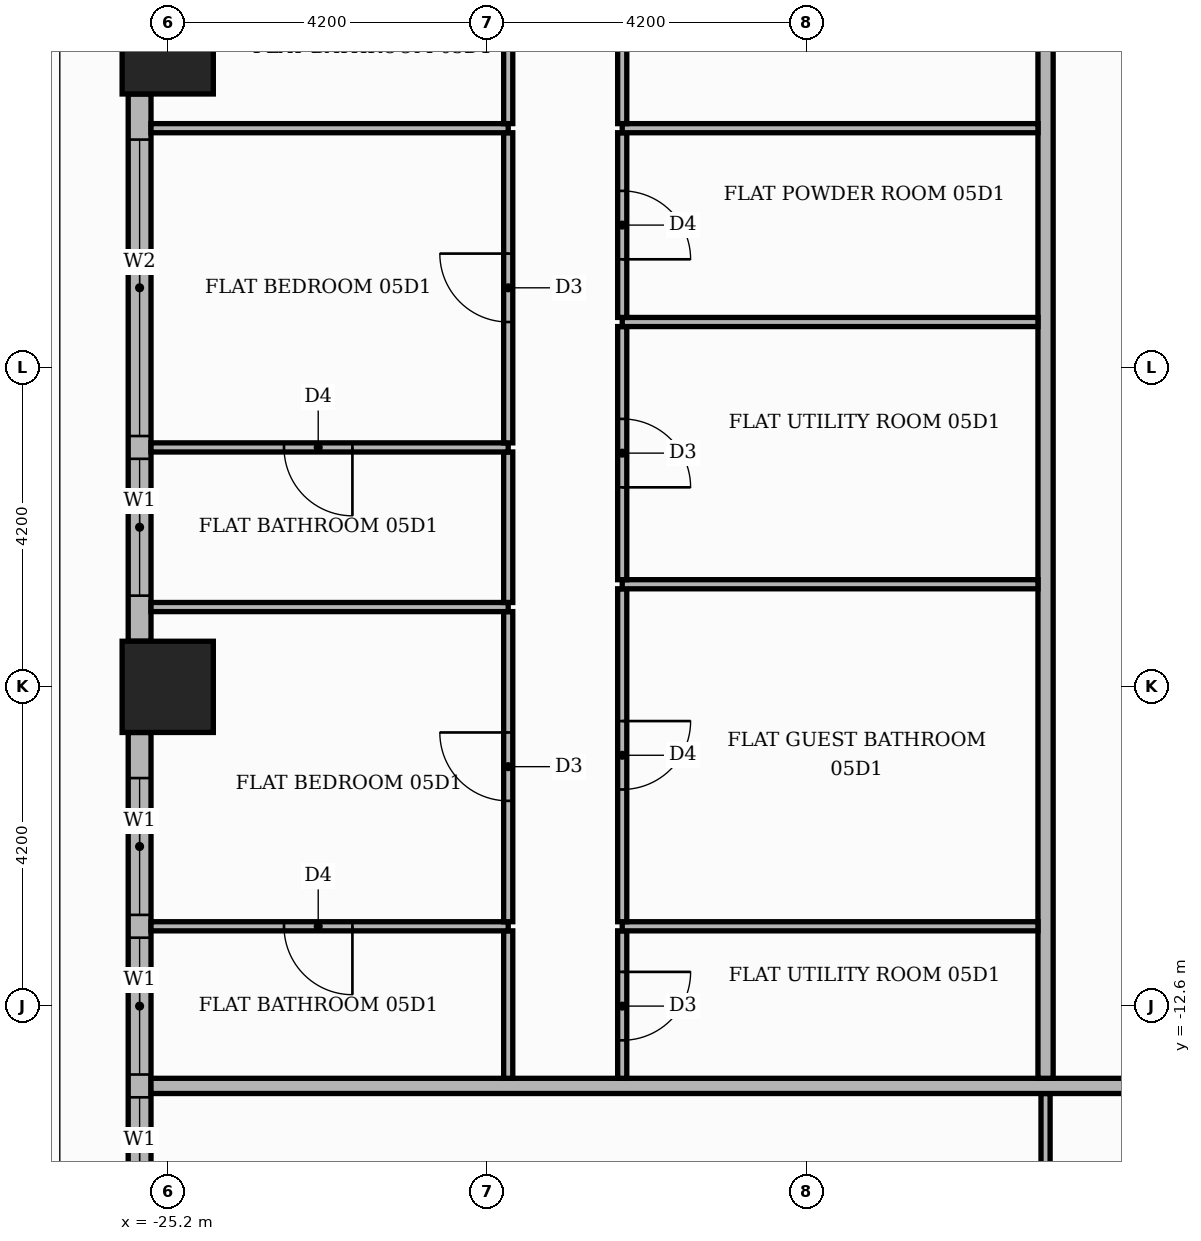
"""IFC4 building model, lengths in metres.
Left out: names, types, materials, properties, quantities, classifications, styles, units other than length and angle.
Written with IfcOpenShell. Run it as: python <this file> out.ifc"""

import sys

from ifc_helpers import new_model, si_unit, direction, frame, frame_2d, origin, origin_2d, place, context, subcontext, project, spatial, rectangle, extrude, element, fill, save


model = new_model("IFC4")
c1 = context("Model", 3, precision=1e-05, world=origin(), true_north=direction((0.0, 1.0)))
c2 = subcontext(c1, "Body", "Model", "MODEL_VIEW")
j1 = project(units=[si_unit("LENGTHUNIT", "METRE"), si_unit("PLANEANGLEUNIT", "RADIAN")], contexts=[c1])
p1 = place(None, origin())
s1 = spatial("IfcSite", under=j1, at=p1, CompositionType="ELEMENT")
p2 = place(p1, origin())
s2 = spatial("IfcBuilding", under=s1, at=p2, CompositionType="ELEMENT")
p3 = place(p2, frame((0.0, 0.0, 27.0)))
s3 = spatial("IfcBuildingStorey", under=s2, at=p3, CompositionType="ELEMENT", Elevation=27.0)
for number, where, z_axis, x_axis in (
    (1, (-25.2, 0.0, 0.0), (0.0, 0.0, 1.0), (1.0, 0.0, 0.0)),
    (2, (-25.2, -8.4, 0.0), (0.0, 0.0, 1.0), (1.0, 0.0, 0.0)),
):
    element("IfcColumn", number, at=place(p3, frame(where, z_axis=z_axis, x_axis=x_axis)), inside=s3, PredefinedType="COLUMN", context=c2, shape_type="SweptSolid", body=[
        extrude(rectangle(XDim=1.2, YDim=1.2, at=origin_2d()), origin(), (0.0, 0.0, 1.0), 3.9),
    ])
p4 = place(p3, frame((-25.57, -0.6, 0.0), z_axis=(0.0, 0.0, 1.0), x_axis=(0.0, -1.0, 0.0)))
e3 = element("IfcWall", 3, at=p4, inside=s3, PredefinedType="STANDARD", context=c2, shape_type="SweptSolid", body=[
    extrude(rectangle(XDim=7.2, YDim=0.3, at=frame_2d((3.6, 0.0))), origin(), (0.0, 0.0, 1.0), 3.48),
])
p5 = place(p4, frame((0.6, 0.0, 0.9)))
e4 = element("IfcOpeningElement", 4, at=p5, cuts=e3, PredefinedType="OPENING", context=c2, shape_type="SweptSolid", body=[
    extrude(rectangle(XDim=3.9, YDim=2.1, at=frame_2d((1.95, 1.05))), frame((0.0, 0.16, 0.0), z_axis=(0.0, -1.0, 0.0), x_axis=(1.0, 0.0, 0.0)), (0.0, 0.0, 1.0), 0.32),
])
p6 = place(p4, frame((4.8, 0.0, 0.9)))
e5 = element("IfcOpeningElement", 5, at=p6, cuts=e3, PredefinedType="OPENING", context=c2, shape_type="SweptSolid", body=[
    extrude(rectangle(XDim=1.8, YDim=2.1, at=frame_2d((0.9, 1.05))), frame((0.0, 0.16, 0.0), z_axis=(0.0, -1.0, 0.0), x_axis=(1.0, 0.0, 0.0)), (0.0, 0.0, 1.0), 0.32),
])
p7 = place(p3, frame((-25.57, -9.0, 0.0), z_axis=(0.0, 0.0, 1.0), x_axis=(0.0, -1.0, 0.0)))
e6 = element("IfcWall", 6, at=p7, inside=s3, PredefinedType="STANDARD", context=c2, shape_type="SweptSolid", body=[
    extrude(rectangle(XDim=7.2, YDim=0.3, at=frame_2d((3.6, 0.0))), origin(), (0.0, 0.0, 1.0), 3.48),
])
p8 = place(p7, frame((0.6, 0.0, 0.9)))
e7 = element("IfcOpeningElement", 7, at=p8, cuts=e6, PredefinedType="OPENING", context=c2, shape_type="SweptSolid", body=[
    extrude(rectangle(XDim=1.8, YDim=2.1, at=frame_2d((0.9, 1.05))), frame((0.0, 0.16, 0.0), z_axis=(0.0, -1.0, 0.0), x_axis=(1.0, 0.0, 0.0)), (0.0, 0.0, 1.0), 0.32),
])
p9 = place(p7, frame((2.7, 0.0, 0.9)))
e8 = element("IfcOpeningElement", 8, at=p9, cuts=e6, PredefinedType="OPENING", context=c2, shape_type="SweptSolid", body=[
    extrude(rectangle(XDim=1.8, YDim=2.1, at=frame_2d((0.9, 1.05))), frame((0.0, 0.16, 0.0), z_axis=(0.0, -1.0, 0.0), x_axis=(1.0, 0.0, 0.0)), (0.0, 0.0, 1.0), 0.32),
])
p10 = place(p7, frame((4.8, 0.0, 0.9)))
e9 = element("IfcOpeningElement", 9, at=p10, cuts=e6, PredefinedType="OPENING", context=c2, shape_type="SweptSolid", body=[
    extrude(rectangle(XDim=1.8, YDim=2.1, at=frame_2d((0.9, 1.05))), frame((0.0, 0.16, 0.0), z_axis=(0.0, -1.0, 0.0), x_axis=(1.0, 0.0, 0.0)), (0.0, 0.0, 1.0), 0.32),
])
p11 = place(p3, frame((-13.65, -20.06, 0.0), z_axis=(0.0, 0.0, 1.0), x_axis=(0.0, 1.0, 0.0)))
e10 = element("IfcWall", 10, at=p11, inside=s3, PredefinedType="PARTITIONING", context=c2, shape_type="SweptSolid", body=[
    extrude(rectangle(XDim=6.31, YDim=0.12, at=frame_2d((3.155, 0.0))), origin(), (0.0, 0.0, 1.0), 3.48),
])
p12 = place(p11, frame((2.675, 0.0, 0.0)))
e11 = element("IfcOpeningElement", 11, at=p12, cuts=e10, PredefinedType="OPENING", context=c2, shape_type="SweptSolid", body=[
    extrude(rectangle(XDim=1.0, YDim=2.1, at=frame_2d((0.5, 1.05))), frame((0.0, 0.07, 0.0), z_axis=(0.0, -1.0, 0.0), x_axis=(1.0, 0.0, 0.0)), (0.0, 0.0, 1.0), 0.14),
])
p13 = place(p3, frame((-25.42, -13.65, 0.0), z_axis=(0.0, 0.0, 1.0), x_axis=(1.0, 0.0, 0.0)))
e12 = element("IfcWall", 12, at=p13, inside=s3, PredefinedType="PARTITIONING", context=c2, shape_type="SweptSolid", body=[
    extrude(rectangle(XDim=39.07, YDim=0.2, at=frame_2d((19.535, 0.0))), origin(), (0.0, 0.0, 1.0), 3.48),
])
p14 = place(p13, frame((14.37, 0.0, 0.0)))
e13 = element("IfcOpeningElement", 13, at=p14, cuts=e12, PredefinedType="OPENING", context=c2, shape_type="SweptSolid", body=[
    extrude(rectangle(XDim=1.1, YDim=2.4, at=frame_2d((0.55, 1.2))), frame((0.0, 0.11, 0.0), z_axis=(0.0, -1.0, 0.0), x_axis=(1.0, 0.0, 0.0)), (0.0, 0.0, 1.0), 0.22),
])
p15 = place(p3, frame((-20.72, -13.55, 0.0), z_axis=(0.0, 0.0, 1.0), x_axis=(0.0, 1.0, 0.0)))
e14 = element("IfcWall", 14, at=p15, inside=s3, PredefinedType="PARTITIONING", context=c2, shape_type="SweptSolid", body=[
    extrude(rectangle(XDim=1.94, YDim=0.12, at=frame_2d((0.97, 0.0))), origin(), (0.0, 0.0, 1.0), 3.48),
])
p16 = place(p3, frame((-19.22, -13.55, 0.0), z_axis=(0.0, 0.0, 1.0), x_axis=(0.0, 1.0, 0.0)))
e15 = element("IfcWall", 15, at=p16, inside=s3, PredefinedType="PARTITIONING", context=c2, shape_type="SweptSolid", body=[
    extrude(rectangle(XDim=1.94, YDim=0.12, at=frame_2d((0.97, 0.0))), origin(), (0.0, 0.0, 1.0), 3.48),
])
p17 = place(p16, frame((0.5, 0.0, 0.0)))
e16 = element("IfcOpeningElement", 16, at=p17, cuts=e15, PredefinedType="OPENING", context=c2, shape_type="SweptSolid", body=[
    extrude(rectangle(XDim=0.9, YDim=2.1, at=frame_2d((0.45, 1.05))), frame((0.0, 0.07, 0.0), z_axis=(0.0, -1.0, 0.0), x_axis=(1.0, 0.0, 0.0)), (0.0, 0.0, 1.0), 0.14),
])
p18 = place(p3, frame((-13.65, -13.55, 0.0), z_axis=(0.0, 0.0, 1.0), x_axis=(0.0, 1.0, 0.0)))
e17 = element("IfcWall", 17, at=p18, inside=s3, PredefinedType="PARTITIONING", context=c2, shape_type="SweptSolid", body=[
    extrude(rectangle(XDim=27.1, YDim=0.2, at=frame_2d((13.55, 0.0))), origin(), (0.0, 0.0, 1.0), 3.48),
])
p19 = place(p18, frame((24.55, 0.0, 0.0)))
e18 = element("IfcOpeningElement", 18, at=p19, cuts=e17, PredefinedType="OPENING", context=c2, shape_type="SweptSolid", body=[
    extrude(rectangle(XDim=1.1, YDim=2.4, at=frame_2d((0.55, 1.2))), frame((0.0, 0.11, 0.0), z_axis=(0.0, -1.0, 0.0), x_axis=(1.0, 0.0, 0.0)), (0.0, 0.0, 1.0), 0.22),
])
p20 = place(p3, frame((-25.42, -11.55, 0.0), z_axis=(0.0, 0.0, 1.0), x_axis=(1.0, 0.0, 0.0)))
e19 = element("IfcWall", 19, at=p20, inside=s3, PredefinedType="PARTITIONING", context=c2, shape_type="SweptSolid", body=[
    extrude(rectangle(XDim=4.7, YDim=0.12, at=frame_2d((2.35, 0.0))), origin(), (0.0, 0.0, 1.0), 3.48),
])
p21 = place(p20, frame((1.75, 0.0, 0.0)))
e20 = element("IfcOpeningElement", 20, at=p21, cuts=e19, PredefinedType="OPENING", context=c2, shape_type="SweptSolid", body=[
    extrude(rectangle(XDim=0.9, YDim=2.1, at=frame_2d((0.45, 1.05))), frame((0.0, 0.07, 0.0), z_axis=(0.0, -1.0, 0.0), x_axis=(1.0, 0.0, 0.0)), (0.0, 0.0, 1.0), 0.14),
])
p22 = place(p3, frame((-19.22, -11.55, 0.0), z_axis=(0.0, 0.0, 1.0), x_axis=(1.0, 0.0, 0.0)))
e21 = element("IfcWall", 21, at=p22, inside=s3, PredefinedType="PARTITIONING", context=c2, shape_type="SweptSolid", body=[
    extrude(rectangle(XDim=5.47, YDim=0.12, at=frame_2d((2.735, 0.0))), origin(), (0.0, 0.0, 1.0), 3.48),
])
p23 = place(p3, frame((-20.72, -11.49, 0.0), z_axis=(0.0, 0.0, 1.0), x_axis=(0.0, 1.0, 0.0)))
e22 = element("IfcWall", 22, at=p23, inside=s3, PredefinedType="PARTITIONING", context=c2, shape_type="SweptSolid", body=[
    extrude(rectangle(XDim=4.08, YDim=0.12, at=frame_2d((2.04, 0.0))), origin(), (0.0, 0.0, 1.0), 3.48),
])
p24 = place(p23, frame((1.59, 0.0, 0.0)))
e23 = element("IfcOpeningElement", 23, at=p24, cuts=e22, PredefinedType="OPENING", context=c2, shape_type="SweptSolid", body=[
    extrude(rectangle(XDim=0.9, YDim=2.1, at=frame_2d((0.45, 1.05))), frame((0.0, 0.07, 0.0), z_axis=(0.0, -1.0, 0.0), x_axis=(1.0, 0.0, 0.0)), (0.0, 0.0, 1.0), 0.14),
])
p25 = place(p3, frame((-19.22, -11.49, 0.0), z_axis=(0.0, 0.0, 1.0), x_axis=(0.0, 1.0, 0.0)))
e24 = element("IfcWall", 24, at=p25, inside=s3, PredefinedType="PARTITIONING", context=c2, shape_type="SweptSolid", body=[
    extrude(rectangle(XDim=4.38, YDim=0.12, at=frame_2d((2.19, 0.0))), origin(), (0.0, 0.0, 1.0), 3.48),
])
p26 = place(p25, frame((1.74, 0.0, 0.0)))
e25 = element("IfcOpeningElement", 25, at=p26, cuts=e24, PredefinedType="OPENING", context=c2, shape_type="SweptSolid", body=[
    extrude(rectangle(XDim=0.9, YDim=2.1, at=frame_2d((0.45, 1.05))), frame((0.0, 0.07, 0.0), z_axis=(0.0, -1.0, 0.0), x_axis=(1.0, 0.0, 0.0)), (0.0, 0.0, 1.0), 0.14),
])
p27 = place(p3, frame((-25.42, -7.35, 0.0), z_axis=(0.0, 0.0, 1.0), x_axis=(1.0, 0.0, 0.0)))
e26 = element("IfcWall", 26, at=p27, inside=s3, PredefinedType="PARTITIONING", context=c2, shape_type="SweptSolid", body=[
    extrude(rectangle(XDim=4.7, YDim=0.12, at=frame_2d((2.35, 0.0))), origin(), (0.0, 0.0, 1.0), 3.48),
])
p28 = place(p3, frame((-20.72, -7.29, 0.0), z_axis=(0.0, 0.0, 1.0), x_axis=(0.0, 1.0, 0.0)))
e27 = element("IfcWall", 27, at=p28, inside=s3, PredefinedType="PARTITIONING", context=c2, shape_type="SweptSolid", body=[
    extrude(rectangle(XDim=1.98, YDim=0.12, at=frame_2d((0.99, 0.0))), origin(), (0.0, 0.0, 1.0), 3.48),
])
p29 = place(p3, frame((-19.22, -7.05, 0.0), z_axis=(0.0, 0.0, 1.0), x_axis=(1.0, 0.0, 0.0)))
e28 = element("IfcWall", 28, at=p29, inside=s3, PredefinedType="PARTITIONING", context=c2, shape_type="SweptSolid", body=[
    extrude(rectangle(XDim=5.47, YDim=0.12, at=frame_2d((2.735, 0.0))), origin(), (0.0, 0.0, 1.0), 3.48),
])
p30 = place(p3, frame((-19.22, -6.99, 0.0), z_axis=(0.0, 0.0, 1.0), x_axis=(0.0, 1.0, 0.0)))
e29 = element("IfcWall", 29, at=p30, inside=s3, PredefinedType="PARTITIONING", context=c2, shape_type="SweptSolid", body=[
    extrude(rectangle(XDim=3.33, YDim=0.12, at=frame_2d((1.665, 0.0))), origin(), (0.0, 0.0, 1.0), 3.48),
])
p31 = place(p30, frame((1.215, 0.0, 0.0)))
e30 = element("IfcOpeningElement", 30, at=p31, cuts=e29, PredefinedType="OPENING", context=c2, shape_type="SweptSolid", body=[
    extrude(rectangle(XDim=0.9, YDim=2.1, at=frame_2d((0.45, 1.05))), frame((0.0, 0.07, 0.0), z_axis=(0.0, -1.0, 0.0), x_axis=(1.0, 0.0, 0.0)), (0.0, 0.0, 1.0), 0.14),
])
p32 = place(p3, frame((-25.42, -5.25, 0.0), z_axis=(0.0, 0.0, 1.0), x_axis=(1.0, 0.0, 0.0)))
e31 = element("IfcWall", 31, at=p32, inside=s3, PredefinedType="PARTITIONING", context=c2, shape_type="SweptSolid", body=[
    extrude(rectangle(XDim=4.7, YDim=0.12, at=frame_2d((2.35, 0.0))), origin(), (0.0, 0.0, 1.0), 3.48),
])
p33 = place(p32, frame((1.75, 0.0, 0.0)))
e32 = element("IfcOpeningElement", 32, at=p33, cuts=e31, PredefinedType="OPENING", context=c2, shape_type="SweptSolid", body=[
    extrude(rectangle(XDim=0.9, YDim=2.1, at=frame_2d((0.45, 1.05))), frame((0.0, 0.07, 0.0), z_axis=(0.0, -1.0, 0.0), x_axis=(1.0, 0.0, 0.0)), (0.0, 0.0, 1.0), 0.14),
])
p34 = place(p3, frame((-20.72, -5.19, 0.0), z_axis=(0.0, 0.0, 1.0), x_axis=(0.0, 1.0, 0.0)))
e33 = element("IfcWall", 33, at=p34, inside=s3, PredefinedType="PARTITIONING", context=c2, shape_type="SweptSolid", body=[
    extrude(rectangle(XDim=4.08, YDim=0.12, at=frame_2d((2.04, 0.0))), origin(), (0.0, 0.0, 1.0), 3.48),
])
p35 = place(p34, frame((1.59, 0.0, 0.0)))
e34 = element("IfcOpeningElement", 34, at=p35, cuts=e33, PredefinedType="OPENING", context=c2, shape_type="SweptSolid", body=[
    extrude(rectangle(XDim=0.9, YDim=2.1, at=frame_2d((0.45, 1.05))), frame((0.0, 0.07, 0.0), z_axis=(0.0, -1.0, 0.0), x_axis=(1.0, 0.0, 0.0)), (0.0, 0.0, 1.0), 0.14),
])
p36 = place(p3, frame((-19.22, -3.6, 0.0), z_axis=(0.0, 0.0, 1.0), x_axis=(1.0, 0.0, 0.0)))
e35 = element("IfcWall", 35, at=p36, inside=s3, PredefinedType="PARTITIONING", context=c2, shape_type="SweptSolid", body=[
    extrude(rectangle(XDim=5.47, YDim=0.12, at=frame_2d((2.735, 0.0))), origin(), (0.0, 0.0, 1.0), 3.48),
])
p37 = place(p3, frame((-19.22, -3.54, 0.0), z_axis=(0.0, 0.0, 1.0), x_axis=(0.0, 1.0, 0.0)))
e36 = element("IfcWall", 36, at=p37, inside=s3, PredefinedType="PARTITIONING", context=c2, shape_type="SweptSolid", body=[
    extrude(rectangle(XDim=2.43, YDim=0.12, at=frame_2d((1.215, 0.0))), origin(), (0.0, 0.0, 1.0), 3.48),
])
p38 = place(p37, frame((0.765, 0.0, 0.0)))
e37 = element("IfcOpeningElement", 37, at=p38, cuts=e36, PredefinedType="OPENING", context=c2, shape_type="SweptSolid", body=[
    extrude(rectangle(XDim=0.9, YDim=2.1, at=frame_2d((0.45, 1.05))), frame((0.0, 0.07, 0.0), z_axis=(0.0, -1.0, 0.0), x_axis=(1.0, 0.0, 0.0)), (0.0, 0.0, 1.0), 0.14),
])
p39 = place(p3, frame((-25.42, -1.05, 0.0), z_axis=(0.0, 0.0, 1.0), x_axis=(1.0, 0.0, 0.0)))
e38 = element("IfcWall", 38, at=p39, inside=s3, PredefinedType="PARTITIONING", context=c2, shape_type="SweptSolid", body=[
    extrude(rectangle(XDim=4.7, YDim=0.12, at=frame_2d((2.35, 0.0))), origin(), (0.0, 0.0, 1.0), 3.48),
])
p40 = place(p3, frame((-19.22, -1.05, 0.0), z_axis=(0.0, 0.0, 1.0), x_axis=(1.0, 0.0, 0.0)))
e39 = element("IfcWall", 39, at=p40, inside=s3, PredefinedType="PARTITIONING", context=c2, shape_type="SweptSolid", body=[
    extrude(rectangle(XDim=5.47, YDim=0.12, at=frame_2d((2.735, 0.0))), origin(), (0.0, 0.0, 1.0), 3.48),
])
p41 = place(p3, frame((-20.72, -0.99, 0.0), z_axis=(0.0, 0.0, 1.0), x_axis=(0.0, 1.0, 0.0)))
e40 = element("IfcWall", 40, at=p41, inside=s3, PredefinedType="PARTITIONING", context=c2, shape_type="SweptSolid", body=[
    extrude(rectangle(XDim=1.98, YDim=0.12, at=frame_2d((0.99, 0.0))), origin(), (0.0, 0.0, 1.0), 3.48),
])
p42 = place(p3, frame((-19.22, -0.99, 0.0), z_axis=(0.0, 0.0, 1.0), x_axis=(0.0, 1.0, 0.0)))
e41 = element("IfcWall", 41, at=p42, inside=s3, PredefinedType="PARTITIONING", context=c2, shape_type="SweptSolid", body=[
    extrude(rectangle(XDim=4.08, YDim=0.12, at=frame_2d((2.04, 0.0))), origin(), (0.0, 0.0, 1.0), 3.48),
])
p43 = place(p42, frame((1.59, 0.0, 0.0)))
e42 = element("IfcOpeningElement", 42, at=p43, cuts=e41, PredefinedType="OPENING", context=c2, shape_type="SweptSolid", body=[
    extrude(rectangle(XDim=0.9, YDim=2.1, at=frame_2d((0.45, 1.05))), frame((0.0, 0.07, 0.0), z_axis=(0.0, -1.0, 0.0), x_axis=(1.0, 0.0, 0.0)), (0.0, 0.0, 1.0), 0.14),
])
p44 = place(p5, origin())
e43 = element("IfcWindow", 43, at=p44, inside=s3, PartitioningType="SINGLE_PANEL", PredefinedType="WINDOW", context=c2, shape_type="SweptSolid", body=[
    extrude(rectangle(XDim=3.9, YDim=2.1, at=frame_2d((1.95, 1.05))), frame((0.0, 0.03, 0.0), z_axis=(0.0, -1.0, 0.0), x_axis=(1.0, 0.0, 0.0)), (0.0, 0.0, 1.0), 0.06),
])
fill(e4, e43)
p45 = place(p6, origin())
e44 = element("IfcWindow", 44, at=p45, inside=s3, PartitioningType="SINGLE_PANEL", PredefinedType="WINDOW", context=c2, shape_type="SweptSolid", body=[
    extrude(rectangle(XDim=1.8, YDim=2.1, at=frame_2d((0.9, 1.05))), frame((0.0, 0.03, 0.0), z_axis=(0.0, -1.0, 0.0), x_axis=(1.0, 0.0, 0.0)), (0.0, 0.0, 1.0), 0.06),
])
fill(e5, e44)
p46 = place(p8, origin())
e45 = element("IfcWindow", 45, at=p46, inside=s3, PartitioningType="SINGLE_PANEL", PredefinedType="WINDOW", context=c2, shape_type="SweptSolid", body=[
    extrude(rectangle(XDim=1.8, YDim=2.1, at=frame_2d((0.9, 1.05))), frame((0.0, 0.03, 0.0), z_axis=(0.0, -1.0, 0.0), x_axis=(1.0, 0.0, 0.0)), (0.0, 0.0, 1.0), 0.06),
])
fill(e7, e45)
p47 = place(p9, origin())
e46 = element("IfcWindow", 46, at=p47, inside=s3, PartitioningType="SINGLE_PANEL", PredefinedType="WINDOW", context=c2, shape_type="SweptSolid", body=[
    extrude(rectangle(XDim=1.8, YDim=2.1, at=frame_2d((0.9, 1.05))), frame((0.0, 0.03, 0.0), z_axis=(0.0, -1.0, 0.0), x_axis=(1.0, 0.0, 0.0)), (0.0, 0.0, 1.0), 0.06),
])
fill(e8, e46)
p48 = place(p10, origin())
e47 = element("IfcWindow", 47, at=p48, inside=s3, PartitioningType="SINGLE_PANEL", PredefinedType="WINDOW", context=c2, shape_type="SweptSolid", body=[
    extrude(rectangle(XDim=1.8, YDim=2.1, at=frame_2d((0.9, 1.05))), frame((0.0, 0.03, 0.0), z_axis=(0.0, -1.0, 0.0), x_axis=(1.0, 0.0, 0.0)), (0.0, 0.0, 1.0), 0.06),
])
fill(e9, e47)
p49 = place(p38, frame((0.9, 0.0, 0.0), z_axis=(0.0, 0.0, 1.0), x_axis=(-1.0, 0.0, 0.0)))
e48 = element("IfcDoor", 48, at=p49, inside=s3, OperationType="SINGLE_SWING_LEFT", PredefinedType="DOOR", context=c2, shape_type="SweptSolid", body=[
    extrude(rectangle(XDim=0.9, YDim=2.1, at=frame_2d((0.45, 1.05))), frame((0.0, 0.025, 0.0), z_axis=(0.0, -1.0, 0.0), x_axis=(1.0, 0.0, 0.0)), (0.0, 0.0, 1.0), 0.05),
])
fill(e37, e48)
p50 = place(p31, frame((0.9, 0.0, 0.0), z_axis=(0.0, 0.0, 1.0), x_axis=(-1.0, 0.0, 0.0)))
e49 = element("IfcDoor", 49, at=p50, inside=s3, OperationType="SINGLE_SWING_LEFT", PredefinedType="DOOR", context=c2, shape_type="SweptSolid", body=[
    extrude(rectangle(XDim=0.9, YDim=2.1, at=frame_2d((0.45, 1.05))), frame((0.0, 0.025, 0.0), z_axis=(0.0, -1.0, 0.0), x_axis=(1.0, 0.0, 0.0)), (0.0, 0.0, 1.0), 0.05),
])
fill(e30, e49)
p51 = place(p26, frame((0.9, 0.0, 0.0), z_axis=(0.0, 0.0, 1.0), x_axis=(-1.0, 0.0, 0.0)))
e50 = element("IfcDoor", 50, at=p51, inside=s3, OperationType="SINGLE_SWING_RIGHT", PredefinedType="DOOR", context=c2, shape_type="SweptSolid", body=[
    extrude(rectangle(XDim=0.9, YDim=2.1, at=frame_2d((0.45, 1.05))), frame((0.0, 0.025, 0.0), z_axis=(0.0, -1.0, 0.0), x_axis=(1.0, 0.0, 0.0)), (0.0, 0.0, 1.0), 0.05),
])
fill(e25, e50)
p52 = place(p17, frame((0.9, 0.0, 0.0), z_axis=(0.0, 0.0, 1.0), x_axis=(-1.0, 0.0, 0.0)))
e51 = element("IfcDoor", 51, at=p52, inside=s3, OperationType="SINGLE_SWING_RIGHT", PredefinedType="DOOR", context=c2, shape_type="SweptSolid", body=[
    extrude(rectangle(XDim=0.9, YDim=2.1, at=frame_2d((0.45, 1.05))), frame((0.0, 0.025, 0.0), z_axis=(0.0, -1.0, 0.0), x_axis=(1.0, 0.0, 0.0)), (0.0, 0.0, 1.0), 0.05),
])
fill(e16, e51)
p53 = place(p35, origin())
e52 = element("IfcDoor", 52, at=p53, inside=s3, OperationType="SINGLE_SWING_RIGHT", PredefinedType="DOOR", context=c2, shape_type="SweptSolid", body=[
    extrude(rectangle(XDim=0.9, YDim=2.1, at=frame_2d((0.45, 1.05))), frame((0.0, 0.025, 0.0), z_axis=(0.0, -1.0, 0.0), x_axis=(1.0, 0.0, 0.0)), (0.0, 0.0, 1.0), 0.05),
])
fill(e34, e52)
p54 = place(p33, frame((0.9, 0.0, 0.0), z_axis=(0.0, 0.0, 1.0), x_axis=(-1.0, 0.0, 0.0)))
e53 = element("IfcDoor", 53, at=p54, inside=s3, OperationType="SINGLE_SWING_RIGHT", PredefinedType="DOOR", context=c2, shape_type="SweptSolid", body=[
    extrude(rectangle(XDim=0.9, YDim=2.1, at=frame_2d((0.45, 1.05))), frame((0.0, 0.025, 0.0), z_axis=(0.0, -1.0, 0.0), x_axis=(1.0, 0.0, 0.0)), (0.0, 0.0, 1.0), 0.05),
])
fill(e32, e53)
p55 = place(p24, origin())
e54 = element("IfcDoor", 54, at=p55, inside=s3, OperationType="SINGLE_SWING_RIGHT", PredefinedType="DOOR", context=c2, shape_type="SweptSolid", body=[
    extrude(rectangle(XDim=0.9, YDim=2.1, at=frame_2d((0.45, 1.05))), frame((0.0, 0.025, 0.0), z_axis=(0.0, -1.0, 0.0), x_axis=(1.0, 0.0, 0.0)), (0.0, 0.0, 1.0), 0.05),
])
fill(e23, e54)
p56 = place(p21, frame((0.9, 0.0, 0.0), z_axis=(0.0, 0.0, 1.0), x_axis=(-1.0, 0.0, 0.0)))
e55 = element("IfcDoor", 55, at=p56, inside=s3, OperationType="SINGLE_SWING_RIGHT", PredefinedType="DOOR", context=c2, shape_type="SweptSolid", body=[
    extrude(rectangle(XDim=0.9, YDim=2.1, at=frame_2d((0.45, 1.05))), frame((0.0, 0.025, 0.0), z_axis=(0.0, -1.0, 0.0), x_axis=(1.0, 0.0, 0.0)), (0.0, 0.0, 1.0), 0.05),
])
fill(e20, e55)
save(model, sys.argv[1])
